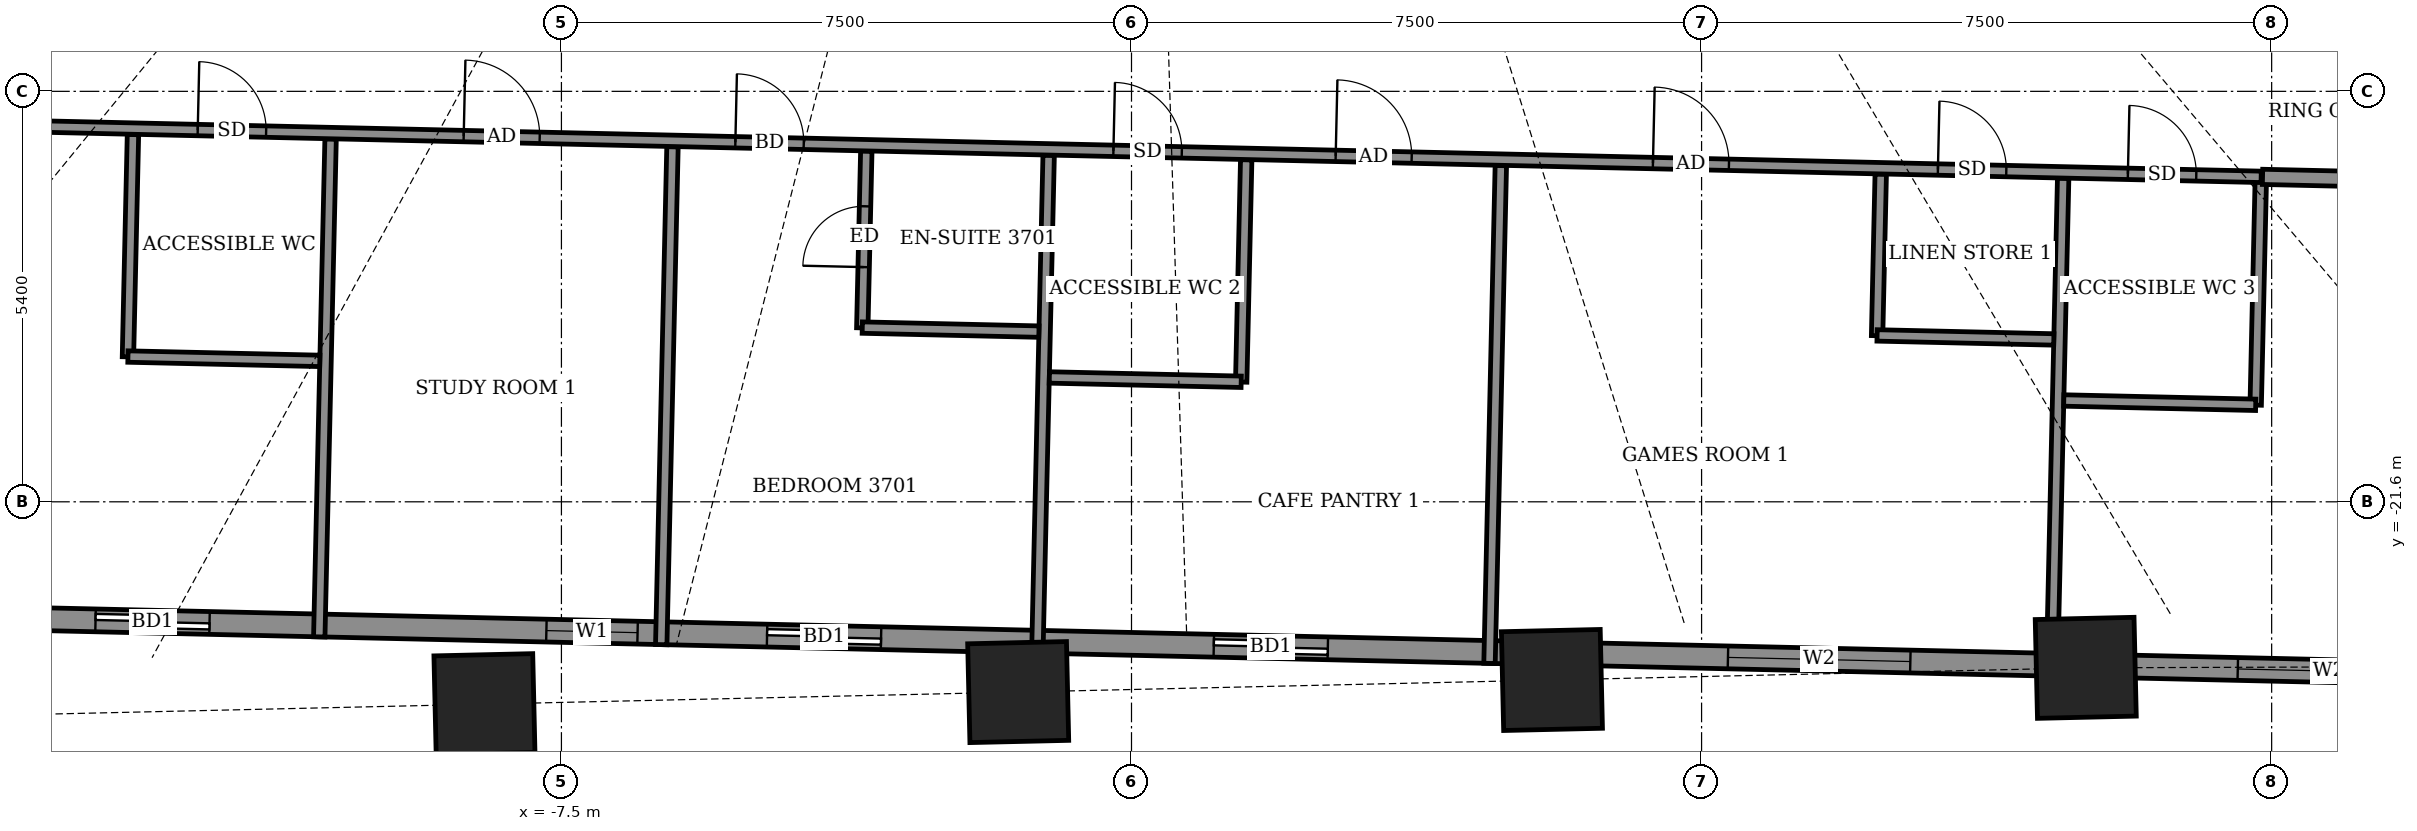
"""IFC4 building model, lengths in metres.
Left out: names, types, materials, properties, quantities, classifications, styles, units other than length and angle.
Written with IfcOpenShell. Run it as: python <this file> out.ifc"""

import sys

from ifc_helpers import new_model, si_unit, direction, frame, frame_2d, origin, origin_2d, place, context, subcontext, project, spatial, rectangle, extrude, element, fill, save


model = new_model("IFC4")
c1 = context("Model", 3, precision=1e-05, world=origin(), true_north=direction((0.0, 1.0)))
c2 = subcontext(c1, "Body", "Model", "MODEL_VIEW")
j1 = project(units=[si_unit("LENGTHUNIT", "METRE"), si_unit("PLANEANGLEUNIT", "RADIAN")], contexts=[c1])
p1 = place(None, origin())
s1 = spatial("IfcSite", under=j1, at=p1, CompositionType="ELEMENT")
p2 = place(p1, origin())
s2 = spatial("IfcBuilding", under=s1, at=p2, CompositionType="ELEMENT")
p3 = place(p2, frame((0.0, 0.0, 148.1)))
s3 = spatial("IfcBuildingStorey", under=s2, at=p3, CompositionType="ELEMENT", Elevation=148.1)
for number, where, z_axis, x_axis in (
    (1, (-8.513, -24.262, -0.55), (0.0, 0.0, 1.0), (1.0, 0.023, 0.0)),
    (2, (-1.491, -24.103, -0.55), (0.0, 0.0, 1.0), (1.0, 0.023, 0.0)),
    (3, (5.531, -23.944, -0.55), (0.0, 0.0, 1.0), (1.0, 0.023, 0.0)),
    (4, (12.554, -23.784, -0.55), (0.0, 0.0, 1.0), (1.0, 0.023, 0.0)),
):
    element("IfcColumn", number, at=place(p3, frame(where, z_axis=z_axis, x_axis=x_axis)), inside=s3, PredefinedType="COLUMN", context=c2, shape_type="SweptSolid", body=[
        extrude(rectangle(XDim=1.3, YDim=1.3, at=origin_2d()), origin(), (0.0, 0.0, 1.0), 4.6),
    ])
p4 = place(p3, frame((-18.781, -23.043, 0.0), z_axis=(0.0, 0.0, 1.0), x_axis=(0.999742794992, -0.022679150367, 0.0)))
e5 = element("IfcWall", 5, at=p4, inside=s3, PredefinedType="SOLIDWALL", context=c2, shape_type="SweptSolid", body=[
    extrude(rectangle(XDim=38.98, YDim=0.3, at=frame_2d((19.49, 0.0))), origin(), (0.0, 0.0, 1.0), 2.45),
])
p5 = place(p4, frame((5.153, 0.0, 0.0)))
e6 = element("IfcOpeningElement", 6, at=p5, cuts=e5, PredefinedType="OPENING", context=c2, shape_type="SweptSolid", body=[
    extrude(rectangle(XDim=1.5, YDim=2.4, at=frame_2d((0.75, 1.2))), frame((0.0, 0.16, 0.0), z_axis=(0.0, -1.0, 0.0), x_axis=(1.0, 0.0, 0.0)), (0.0, 0.0, 1.0), 0.32),
])
p6 = place(p4, frame((11.086, 0.0, 0.9)))
e7 = element("IfcOpeningElement", 7, at=p6, cuts=e5, PredefinedType="OPENING", context=c2, shape_type="SweptSolid", body=[
    extrude(rectangle(XDim=1.2, YDim=1.5, at=frame_2d((0.6, 0.75))), frame((0.0, 0.16, 0.0), z_axis=(0.0, -1.0, 0.0), x_axis=(1.0, 0.0, 0.0)), (0.0, 0.0, 1.0), 0.32),
])
p7 = place(p4, frame((13.99, 0.0, 0.0)))
e8 = element("IfcOpeningElement", 8, at=p7, cuts=e5, PredefinedType="OPENING", context=c2, shape_type="SweptSolid", body=[
    extrude(rectangle(XDim=1.5, YDim=2.4, at=frame_2d((0.75, 1.2))), frame((0.0, 0.16, 0.0), z_axis=(0.0, -1.0, 0.0), x_axis=(1.0, 0.0, 0.0)), (0.0, 0.0, 1.0), 0.32),
])
p8 = place(p4, frame((19.869, 0.0, 0.0)))
e9 = element("IfcOpeningElement", 9, at=p8, cuts=e5, PredefinedType="OPENING", context=c2, shape_type="SweptSolid", body=[
    extrude(rectangle(XDim=1.5, YDim=2.4, at=frame_2d((0.75, 1.2))), frame((0.0, 0.16, 0.0), z_axis=(0.0, -1.0, 0.0), x_axis=(1.0, 0.0, 0.0)), (0.0, 0.0, 1.0), 0.32),
])
p9 = place(p4, frame((26.635, 0.0, 0.9)))
e10 = element("IfcOpeningElement", 10, at=p9, cuts=e5, PredefinedType="OPENING", context=c2, shape_type="SweptSolid", body=[
    extrude(rectangle(XDim=2.4, YDim=1.5, at=frame_2d((1.2, 0.75))), frame((0.0, 0.16, 0.0), z_axis=(0.0, -1.0, 0.0), x_axis=(1.0, 0.0, 0.0)), (0.0, 0.0, 1.0), 0.32),
])
p10 = place(p4, frame((33.344, 0.0, 0.9)))
e11 = element("IfcOpeningElement", 11, at=p10, cuts=e5, PredefinedType="OPENING", context=c2, shape_type="SweptSolid", body=[
    extrude(rectangle(XDim=2.4, YDim=1.5, at=frame_2d((1.2, 0.75))), frame((0.0, 0.16, 0.0), z_axis=(0.0, -1.0, 0.0), x_axis=(1.0, 0.0, 0.0)), (0.0, 0.0, 1.0), 0.32),
])
p11 = place(p3, frame((-10.686, -23.377, 0.0), z_axis=(0.0, 0.0, 1.0), x_axis=(0.022734104141, 0.999741546855, 0.0)))
e12 = element("IfcWall", 12, at=p11, inside=s3, PredefinedType="PARTITIONING", context=c2, shape_type="SweptSolid", body=[
    extrude(rectangle(XDim=6.551, YDim=0.15, at=frame_2d((3.275, 0.0))), origin(), (0.0, 0.0, 1.0), 2.65),
])
p12 = place(p3, frame((-6.187, -23.479, 0.0), z_axis=(0.0, 0.0, 1.0), x_axis=(0.022585104341, 0.999744923999, 0.0)))
e13 = element("IfcWall", 13, at=p12, inside=s3, PredefinedType="PARTITIONING", context=c2, shape_type="SweptSolid", body=[
    extrude(rectangle(XDim=6.551, YDim=0.15, at=frame_2d((3.275, 0.0))), origin(), (0.0, 0.0, 1.0), 2.75),
])
p13 = place(p3, frame((-1.239, -23.591, 0.0), z_axis=(0.0, 0.0, 1.0), x_axis=(0.022734104141, 0.999741546855, 0.0)))
e14 = element("IfcWall", 14, at=p13, inside=s3, PredefinedType="PARTITIONING", context=c2, shape_type="SweptSolid", body=[
    extrude(rectangle(XDim=6.551, YDim=0.15, at=frame_2d((3.275, 0.0))), origin(), (0.0, 0.0, 1.0), 4.05),
])
p14 = place(p3, frame((4.71, -23.726, 0.0), z_axis=(0.0, 0.0, 1.0), x_axis=(0.022734104141, 0.999741546855, 0.0)))
e15 = element("IfcWall", 15, at=p14, inside=s3, PredefinedType="PARTITIONING", context=c2, shape_type="SweptSolid", body=[
    extrude(rectangle(XDim=6.551, YDim=0.15, at=frame_2d((3.275, 0.0))), origin(), (0.0, 0.0, 1.0), 2.75),
])
p15 = place(p3, frame((12.108, -23.894, 0.0), z_axis=(0.0, 0.0, 1.0), x_axis=(0.022771353855, 0.999740699103, 0.0)))
e16 = element("IfcWall", 16, at=p15, inside=s3, PredefinedType="PARTITIONING", context=c2, shape_type="SweptSolid", body=[
    extrude(rectangle(XDim=6.551, YDim=0.15, at=frame_2d((3.275, 0.0))), origin(), (0.0, 0.0, 1.0), 2.65),
])
p16 = place(p3, frame((-13.203, -19.693, 0.0), z_axis=(0.0, 0.0, 1.0), x_axis=(0.022537481811, 0.999745998698, 0.0)))
e17 = element("IfcWall", 17, at=p16, inside=s3, PredefinedType="PARTITIONING", context=c2, shape_type="SweptSolid", body=[
    extrude(rectangle(XDim=2.925, YDim=0.15, at=frame_2d((1.462, 0.0))), origin(), (0.0, 0.0, 1.0), 2.45),
])
p17 = place(p3, frame((1.443, -20.025, 0.0), z_axis=(0.0, 0.0, 1.0), x_axis=(0.022539362742, 0.999745956294, 0.0)))
e18 = element("IfcWall", 18, at=p17, inside=s3, PredefinedType="PARTITIONING", context=c2, shape_type="SweptSolid", body=[
    extrude(rectangle(XDim=2.925, YDim=0.15, at=frame_2d((1.462, 0.0))), origin(), (0.0, 0.0, 1.0), 4.05),
])
p18 = place(p3, frame((14.79, -20.328, 0.0), z_axis=(0.0, 0.0, 1.0), x_axis=(0.02262711266, 0.999743974112, 0.0)))
e19 = element("IfcWall", 19, at=p18, inside=s3, PredefinedType="PARTITIONING", context=c2, shape_type="SweptSolid", body=[
    extrude(rectangle(XDim=3.0, YDim=0.15, at=frame_2d((1.5, 0.0))), origin(), (0.0, 0.0, 1.0), 2.65),
])
p19 = place(p3, frame((-13.203, -19.689, 0.0), z_axis=(0.0, 0.0, 1.0), x_axis=(0.99974392816, -0.022629142889, 0.0)))
e20 = element("IfcWall", 20, at=p19, inside=s3, PredefinedType="PARTITIONING", context=c2, shape_type="SweptSolid", body=[
    extrude(rectangle(XDim=2.525, YDim=0.15, at=frame_2d((1.262, 0.0))), origin(), (0.0, 0.0, 1.0), 2.65),
])
p20 = place(p3, frame((-1.081, -19.964, 0.0), z_axis=(0.0, 0.0, 1.0), x_axis=(0.999746160391, -0.022530308093, 0.0)))
e21 = element("IfcWall", 21, at=p20, inside=s3, PredefinedType="PARTITIONING", context=c2, shape_type="SweptSolid", body=[
    extrude(rectangle(XDim=2.525, YDim=0.15, at=frame_2d((1.262, 0.0))), origin(), (0.0, 0.0, 1.0), 2.85),
])
p21 = place(p3, frame((12.265, -20.267, 0.0), z_axis=(0.0, 0.0, 1.0), x_axis=(0.999746356616, -0.022521599255, 0.0)))
e22 = element("IfcWall", 22, at=p21, inside=s3, PredefinedType="PARTITIONING", context=c2, shape_type="SweptSolid", body=[
    extrude(rectangle(XDim=2.526, YDim=0.15, at=frame_2d((1.263, 0.0))), origin(), (0.0, 0.0, 1.0), 2.65),
])
p22 = place(p3, frame((-3.542, -19.312, 0.0), z_axis=(0.0, 0.0, 1.0), x_axis=(0.022781023197, 0.999740478815, 0.0)))
e23 = element("IfcWall", 23, at=p22, inside=s3, PredefinedType="PARTITIONING", context=c2, shape_type="SweptSolid", body=[
    extrude(rectangle(XDim=2.325, YDim=0.15, at=frame_2d((1.163, 0.0))), origin(), (0.0, 0.0, 1.0), 4.05),
])
p23 = place(p22, frame((0.8, 0.0, 0.0)))
e24 = element("IfcOpeningElement", 24, at=p23, cuts=e23, PredefinedType="OPENING", context=c2, shape_type="SweptSolid", body=[
    extrude(rectangle(XDim=0.8, YDim=2.1, at=frame_2d((0.4, 1.05))), frame((0.0, 0.085, 0.0), z_axis=(0.0, -1.0, 0.0), x_axis=(1.0, 0.0, 0.0)), (0.0, 0.0, 1.0), 0.17),
])
p24 = place(p3, frame((-3.542, -19.308, 0.0), z_axis=(0.0, 0.0, 1.0), x_axis=(0.999740260747, -0.02279059109, 0.0)))
e25 = element("IfcWall", 25, at=p24, inside=s3, PredefinedType="PARTITIONING", context=c2, shape_type="SweptSolid", body=[
    extrude(rectangle(XDim=2.324, YDim=0.15, at=frame_2d((1.162, 0.0))), origin(), (0.0, 0.0, 1.0), 4.05),
])
p25 = place(p3, frame((9.809, -19.415, 0.0), z_axis=(0.0, 0.0, 1.0), x_axis=(0.02251267524, 0.99974655761, 0.0)))
e26 = element("IfcWall", 26, at=p25, inside=s3, PredefinedType="PARTITIONING", context=c2, shape_type="SweptSolid", body=[
    extrude(rectangle(XDim=2.125, YDim=0.15, at=frame_2d((1.063, 0.0))), origin(), (0.0, 0.0, 1.0), 2.65),
])
p26 = place(p3, frame((9.809, -19.411, 0.0), z_axis=(0.0, 0.0, 1.0), x_axis=(0.999738082346, -0.022885950011, 0.0)))
e27 = element("IfcWall", 27, at=p26, inside=s3, PredefinedType="PARTITIONING", context=c2, shape_type="SweptSolid", body=[
    extrude(rectangle(XDim=2.325, YDim=0.15, at=frame_2d((1.163, 0.0))), origin(), (0.0, 0.0, 1.0), 2.65),
])
p27 = place(p3, frame((-15.649, -16.633, 0.0), z_axis=(0.0, 0.0, 1.0), x_axis=(0.999742978268, -0.022671069754, 0.0)))
e28 = element("IfcWall", 28, at=p27, inside=s3, PredefinedType="PARTITIONING", context=c2, shape_type="SweptSolid", body=[
    extrude(rectangle(XDim=30.519, YDim=0.15, at=frame_2d((15.259, 0.0))), origin(), (0.0, 0.0, 1.0), 2.45),
])
p28 = place(p27, frame((3.365, 0.0, 0.0)))
e29 = element("IfcOpeningElement", 29, at=p28, cuts=e28, PredefinedType="OPENING", context=c2, shape_type="SweptSolid", body=[
    extrude(rectangle(XDim=0.9, YDim=2.1, at=frame_2d((0.45, 1.05))), frame((0.0, 0.085, 0.0), z_axis=(0.0, -1.0, 0.0), x_axis=(1.0, 0.0, 0.0)), (0.0, 0.0, 1.0), 0.17),
])
p29 = place(p27, frame((6.865, 0.0, 0.0)))
e30 = element("IfcOpeningElement", 30, at=p29, cuts=e28, PredefinedType="OPENING", context=c2, shape_type="SweptSolid", body=[
    extrude(rectangle(XDim=1.0, YDim=2.1, at=frame_2d((0.5, 1.05))), frame((0.0, 0.085, 0.0), z_axis=(0.0, -1.0, 0.0), x_axis=(1.0, 0.0, 0.0)), (0.0, 0.0, 1.0), 0.17),
])
p30 = place(p27, frame((10.44, 0.0, 0.0)))
e31 = element("IfcOpeningElement", 31, at=p30, cuts=e28, PredefinedType="OPENING", context=c2, shape_type="SweptSolid", body=[
    extrude(rectangle(XDim=0.9, YDim=2.1, at=frame_2d((0.45, 1.05))), frame((0.0, 0.085, 0.0), z_axis=(0.0, -1.0, 0.0), x_axis=(1.0, 0.0, 0.0)), (0.0, 0.0, 1.0), 0.17),
])
p31 = place(p27, frame((18.34, 0.0, 0.0)))
e32 = element("IfcOpeningElement", 32, at=p31, cuts=e28, PredefinedType="OPENING", context=c2, shape_type="SweptSolid", body=[
    extrude(rectangle(XDim=1.0, YDim=2.1, at=frame_2d((0.5, 1.05))), frame((0.0, 0.085, 0.0), z_axis=(0.0, -1.0, 0.0), x_axis=(1.0, 0.0, 0.0)), (0.0, 0.0, 1.0), 0.17),
])
p32 = place(p27, frame((15.415, 0.0, 0.0)))
e33 = element("IfcOpeningElement", 33, at=p32, cuts=e28, PredefinedType="OPENING", context=c2, shape_type="SweptSolid", body=[
    extrude(rectangle(XDim=0.9, YDim=2.1, at=frame_2d((0.45, 1.05))), frame((0.0, 0.085, 0.0), z_axis=(0.0, -1.0, 0.0), x_axis=(1.0, 0.0, 0.0)), (0.0, 0.0, 1.0), 0.17),
])
p33 = place(p27, frame((22.515, 0.0, 0.0)))
e34 = element("IfcOpeningElement", 34, at=p33, cuts=e28, PredefinedType="OPENING", context=c2, shape_type="SweptSolid", body=[
    extrude(rectangle(XDim=1.0, YDim=2.1, at=frame_2d((0.5, 1.05))), frame((0.0, 0.085, 0.0), z_axis=(0.0, -1.0, 0.0), x_axis=(1.0, 0.0, 0.0)), (0.0, 0.0, 1.0), 0.17),
])
p34 = place(p27, frame((26.265, 0.0, 0.0)))
e35 = element("IfcOpeningElement", 35, at=p34, cuts=e28, PredefinedType="OPENING", context=c2, shape_type="SweptSolid", body=[
    extrude(rectangle(XDim=0.9, YDim=2.1, at=frame_2d((0.45, 1.05))), frame((0.0, 0.085, 0.0), z_axis=(0.0, -1.0, 0.0), x_axis=(1.0, 0.0, 0.0)), (0.0, 0.0, 1.0), 0.17),
])
p35 = place(p27, frame((28.765, 0.0, 0.0)))
e36 = element("IfcOpeningElement", 36, at=p35, cuts=e28, PredefinedType="OPENING", context=c2, shape_type="SweptSolid", body=[
    extrude(rectangle(XDim=0.9, YDim=2.1, at=frame_2d((0.45, 1.05))), frame((0.0, 0.085, 0.0), z_axis=(0.0, -1.0, 0.0), x_axis=(1.0, 0.0, 0.0)), (0.0, 0.0, 1.0), 0.17),
])
p36 = place(p3, frame((14.88, -17.325, 0.0), z_axis=(0.0, 0.0, 1.0), x_axis=(0.999741618182, -0.022730967319, 0.0)))
e37 = element("IfcWall", 37, at=p36, inside=s3, PredefinedType="PARTITIONING", context=c2, shape_type="SweptSolid", body=[
    extrude(rectangle(XDim=6.38, YDim=0.2, at=frame_2d((3.19, 0.0))), origin(), (0.0, 0.0, 1.0), 2.65),
])
p37 = place(p5, origin())
e38 = element("IfcDoor", 38, at=p37, inside=s3, OperationType="SLIDING_TO_LEFT", PredefinedType="DOOR", context=c2, shape_type="SweptSolid", body=[
    extrude(rectangle(XDim=1.5, YDim=2.4, at=frame_2d((0.75, 1.2))), frame((0.0, 0.025, 0.0), z_axis=(0.0, -1.0, 0.0), x_axis=(1.0, 0.0, 0.0)), (0.0, 0.0, 1.0), 0.05),
])
fill(e6, e38)
p38 = place(p6, origin())
e39 = element("IfcWindow", 39, at=p38, inside=s3, PartitioningType="SINGLE_PANEL", PredefinedType="WINDOW", context=c2, shape_type="SweptSolid", body=[
    extrude(rectangle(XDim=1.2, YDim=1.5, at=frame_2d((0.6, 0.75))), frame((0.0, 0.03, 0.0), z_axis=(0.0, -1.0, 0.0), x_axis=(1.0, 0.0, 0.0)), (0.0, 0.0, 1.0), 0.06),
])
fill(e7, e39)
p39 = place(p7, origin())
e40 = element("IfcDoor", 40, at=p39, inside=s3, OperationType="SLIDING_TO_LEFT", PredefinedType="DOOR", context=c2, shape_type="SweptSolid", body=[
    extrude(rectangle(XDim=1.5, YDim=2.4, at=frame_2d((0.75, 1.2))), frame((0.0, 0.025, 0.0), z_axis=(0.0, -1.0, 0.0), x_axis=(1.0, 0.0, 0.0)), (0.0, 0.0, 1.0), 0.05),
])
fill(e8, e40)
p40 = place(p8, origin())
e41 = element("IfcDoor", 41, at=p40, inside=s3, OperationType="SLIDING_TO_LEFT", PredefinedType="DOOR", context=c2, shape_type="SweptSolid", body=[
    extrude(rectangle(XDim=1.5, YDim=2.4, at=frame_2d((0.75, 1.2))), frame((0.0, 0.025, 0.0), z_axis=(0.0, -1.0, 0.0), x_axis=(1.0, 0.0, 0.0)), (0.0, 0.0, 1.0), 0.05),
])
fill(e9, e41)
p41 = place(p9, origin())
e42 = element("IfcWindow", 42, at=p41, inside=s3, PartitioningType="DOUBLE_PANEL_VERTICAL", PredefinedType="WINDOW", context=c2, shape_type="SweptSolid", body=[
    extrude(rectangle(XDim=2.4, YDim=1.5, at=frame_2d((1.2, 0.75))), frame((0.0, 0.03, 0.0), z_axis=(0.0, -1.0, 0.0), x_axis=(1.0, 0.0, 0.0)), (0.0, 0.0, 1.0), 0.06),
])
fill(e10, e42)
p42 = place(p10, origin())
e43 = element("IfcWindow", 43, at=p42, inside=s3, PartitioningType="DOUBLE_PANEL_VERTICAL", PredefinedType="WINDOW", context=c2, shape_type="SweptSolid", body=[
    extrude(rectangle(XDim=2.4, YDim=1.5, at=frame_2d((1.2, 0.75))), frame((0.0, 0.03, 0.0), z_axis=(0.0, -1.0, 0.0), x_axis=(1.0, 0.0, 0.0)), (0.0, 0.0, 1.0), 0.06),
])
fill(e11, e43)
p43 = place(p28, origin())
e44 = element("IfcDoor", 44, at=p43, inside=s3, OperationType="SINGLE_SWING_LEFT", PredefinedType="DOOR", context=c2, shape_type="SweptSolid", body=[
    extrude(rectangle(XDim=0.9, YDim=2.1, at=frame_2d((0.45, 1.05))), frame((0.0, 0.025, 0.0), z_axis=(0.0, -1.0, 0.0), x_axis=(1.0, 0.0, 0.0)), (0.0, 0.0, 1.0), 0.05),
])
fill(e29, e44)
p44 = place(p29, origin())
e45 = element("IfcDoor", 45, at=p44, inside=s3, OperationType="SINGLE_SWING_RIGHT", PredefinedType="DOOR", context=c2, shape_type="SweptSolid", body=[
    extrude(rectangle(XDim=1.0, YDim=2.1, at=frame_2d((0.5, 1.05))), frame((0.0, 0.025, 0.0), z_axis=(0.0, -1.0, 0.0), x_axis=(1.0, 0.0, 0.0)), (0.0, 0.0, 1.0), 0.05),
])
fill(e30, e45)
p45 = place(p30, origin())
e46 = element("IfcDoor", 46, at=p45, inside=s3, OperationType="SINGLE_SWING_LEFT", PredefinedType="DOOR", context=c2, shape_type="SweptSolid", body=[
    extrude(rectangle(XDim=0.9, YDim=2.1, at=frame_2d((0.45, 1.05))), frame((0.0, 0.025, 0.0), z_axis=(0.0, -1.0, 0.0), x_axis=(1.0, 0.0, 0.0)), (0.0, 0.0, 1.0), 0.05),
])
fill(e31, e46)
p46 = place(p23, origin())
e47 = element("IfcDoor", 47, at=p46, inside=s3, OperationType="SINGLE_SWING_LEFT", PredefinedType="DOOR", context=c2, shape_type="SweptSolid", body=[
    extrude(rectangle(XDim=0.8, YDim=2.1, at=frame_2d((0.4, 1.05))), frame((0.0, 0.025, 0.0), z_axis=(0.0, -1.0, 0.0), x_axis=(1.0, 0.0, 0.0)), (0.0, 0.0, 1.0), 0.05),
])
fill(e24, e47)
p47 = place(p31, origin())
e48 = element("IfcDoor", 48, at=p47, inside=s3, OperationType="SINGLE_SWING_LEFT", PredefinedType="DOOR", context=c2, shape_type="SweptSolid", body=[
    extrude(rectangle(XDim=1.0, YDim=2.1, at=frame_2d((0.5, 1.05))), frame((0.0, 0.025, 0.0), z_axis=(0.0, -1.0, 0.0), x_axis=(1.0, 0.0, 0.0)), (0.0, 0.0, 1.0), 0.05),
])
fill(e32, e48)
p48 = place(p32, origin())
e49 = element("IfcDoor", 49, at=p48, inside=s3, OperationType="SINGLE_SWING_RIGHT", PredefinedType="DOOR", context=c2, shape_type="SweptSolid", body=[
    extrude(rectangle(XDim=0.9, YDim=2.1, at=frame_2d((0.45, 1.05))), frame((0.0, 0.025, 0.0), z_axis=(0.0, -1.0, 0.0), x_axis=(1.0, 0.0, 0.0)), (0.0, 0.0, 1.0), 0.05),
])
fill(e33, e49)
p49 = place(p33, origin())
e50 = element("IfcDoor", 50, at=p49, inside=s3, OperationType="SINGLE_SWING_RIGHT", PredefinedType="DOOR", context=c2, shape_type="SweptSolid", body=[
    extrude(rectangle(XDim=1.0, YDim=2.1, at=frame_2d((0.5, 1.05))), frame((0.0, 0.025, 0.0), z_axis=(0.0, -1.0, 0.0), x_axis=(1.0, 0.0, 0.0)), (0.0, 0.0, 1.0), 0.05),
])
fill(e34, e50)
p50 = place(p34, origin())
e51 = element("IfcDoor", 51, at=p50, inside=s3, OperationType="SINGLE_SWING_LEFT", PredefinedType="DOOR", context=c2, shape_type="SweptSolid", body=[
    extrude(rectangle(XDim=0.9, YDim=2.1, at=frame_2d((0.45, 1.05))), frame((0.0, 0.025, 0.0), z_axis=(0.0, -1.0, 0.0), x_axis=(1.0, 0.0, 0.0)), (0.0, 0.0, 1.0), 0.05),
])
fill(e35, e51)
p51 = place(p35, origin())
e52 = element("IfcDoor", 52, at=p51, inside=s3, OperationType="SINGLE_SWING_RIGHT", PredefinedType="DOOR", context=c2, shape_type="SweptSolid", body=[
    extrude(rectangle(XDim=0.9, YDim=2.1, at=frame_2d((0.45, 1.05))), frame((0.0, 0.025, 0.0), z_axis=(0.0, -1.0, 0.0), x_axis=(1.0, 0.0, 0.0)), (0.0, 0.0, 1.0), 0.05),
])
fill(e36, e52)
save(model, sys.argv[1])
